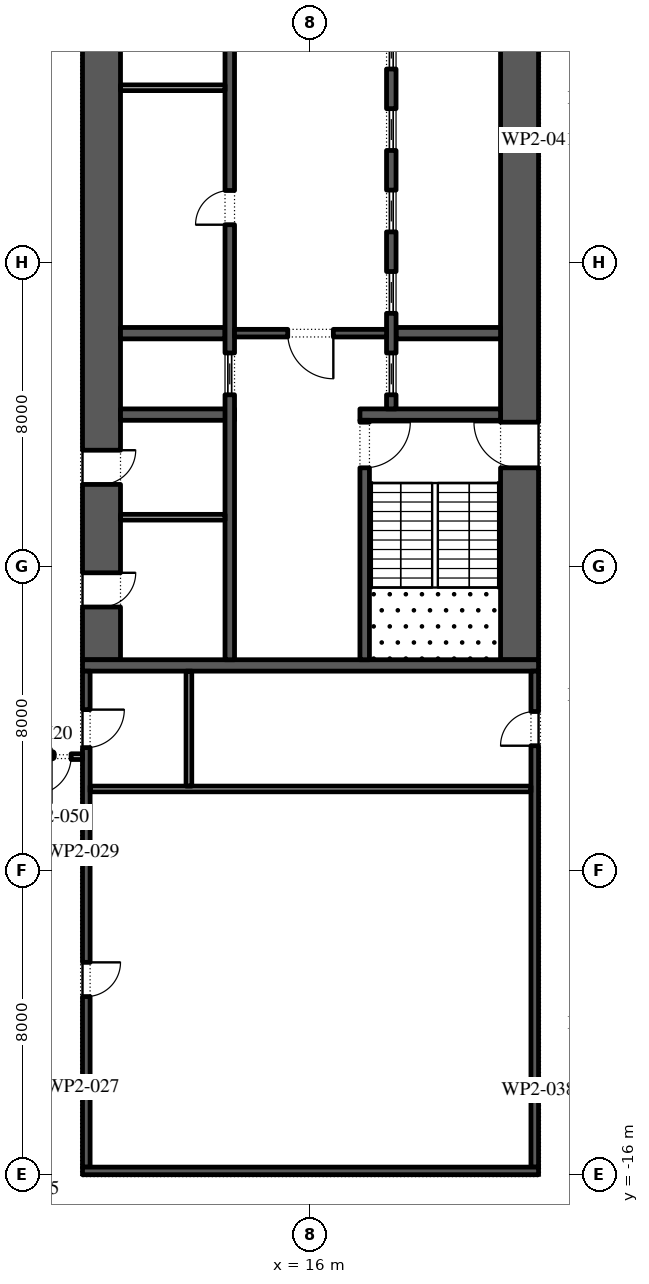
"""IFC4 building model, lengths in metres.
Left out: names, types, materials, properties, quantities, classifications, styles, units other than length and angle.
Written with IfcOpenShell. Run it as: python <this file> out.ifc"""

import sys

from ifc_helpers import new_model, si_unit, direction, frame, frame_2d, origin, place, context, subcontext, project, spatial, rectangle, extrude, element, fill, save


model = new_model("IFC4")
c1 = context("Model", 3, precision=1e-05, world=origin(), true_north=direction((0.0, 1.0)))
c2 = subcontext(c1, "Body", "Model", "MODEL_VIEW")
j1 = project(units=[si_unit("LENGTHUNIT", "METRE"), si_unit("PLANEANGLEUNIT", "RADIAN")], contexts=[c1])
p1 = place(None, origin())
s1 = spatial("IfcSite", under=j1, at=p1, CompositionType="ELEMENT")
p2 = place(p1, origin())
s2 = spatial("IfcBuilding", under=s1, at=p2, CompositionType="ELEMENT")
p3 = place(p2, frame((0.0, 0.0, 39.6)))
s3 = spatial("IfcBuildingStorey", under=s2, at=p3, CompositionType="ELEMENT", Elevation=39.6)
p4 = place(p3, frame((21.5, -2.45, 0.0), z_axis=(0.0, 0.0, 1.0), x_axis=(0.0, 1.0, 0.0)))
e1 = element("IfcWall", 1, at=p4, inside=s3, PredefinedType="SHEAR", context=c2, shape_type="SweptSolid", body=[
    extrude(rectangle(XDim=27.9, YDim=1.0, at=frame_2d((13.95, 0.0))), origin(), (0.0, 0.0, 1.0), 4.0),
])
p5 = place(p4, frame((5.05, 0.0, 0.0)))
e2 = element("IfcOpeningElement", 2, at=p5, cuts=e1, PredefinedType="OPENING", context=c2, shape_type="SweptSolid", body=[
    extrude(rectangle(XDim=1.2, YDim=2.1, at=frame_2d((0.6, 1.05))), frame((0.0, 0.51, 0.0), z_axis=(0.0, -1.0, 0.0), x_axis=(1.0, 0.0, 0.0)), (0.0, 0.0, 1.0), 1.02),
])
p6 = place(p4, frame((21.65, 0.0, 0.0)))
e3 = element("IfcOpeningElement", 3, at=p6, cuts=e1, PredefinedType="OPENING", context=c2, shape_type="SweptSolid", body=[
    extrude(rectangle(XDim=1.2, YDim=2.1, at=frame_2d((0.6, 1.05))), frame((0.0, 0.51, 0.0), z_axis=(0.0, -1.0, 0.0), x_axis=(1.0, 0.0, 0.0)), (0.0, 0.0, 1.0), 1.02),
])
p7 = place(p3, frame((10.5, -2.45, 0.0), z_axis=(0.0, 0.0, 1.0), x_axis=(0.0, 1.0, 0.0)))
e4 = element("IfcWall", 4, at=p7, inside=s3, PredefinedType="SHEAR", context=c2, shape_type="SweptSolid", body=[
    extrude(rectangle(XDim=27.9, YDim=1.0, at=frame_2d((13.95, 0.0))), origin(), (0.0, 0.0, 1.0), 4.0),
])
p8 = place(p7, frame((23.65, 0.0, 0.0)))
e5 = element("IfcOpeningElement", 5, at=p8, cuts=e4, PredefinedType="OPENING", context=c2, shape_type="SweptSolid", body=[
    extrude(rectangle(XDim=2.4, YDim=2.1, at=frame_2d((1.2, 1.05))), frame((0.0, 0.51, 0.0), z_axis=(0.0, -1.0, 0.0), x_axis=(1.0, 0.0, 0.0)), (0.0, 0.0, 1.0), 1.02),
])
p9 = place(p7, frame((1.387, 0.0, 0.0)))
e6 = element("IfcOpeningElement", 6, at=p9, cuts=e4, PredefinedType="OPENING", context=c2, shape_type="SweptSolid", body=[
    extrude(rectangle(XDim=0.9, YDim=2.1, at=frame_2d((0.45, 1.05))), frame((0.0, 0.51, 0.0), z_axis=(0.0, -1.0, 0.0), x_axis=(1.0, 0.0, 0.0)), (0.0, 0.0, 1.0), 1.02),
])
p10 = place(p7, frame((4.613, 0.0, 0.0)))
e7 = element("IfcOpeningElement", 7, at=p10, cuts=e4, PredefinedType="OPENING", context=c2, shape_type="SweptSolid", body=[
    extrude(rectangle(XDim=0.9, YDim=2.1, at=frame_2d((0.45, 1.05))), frame((0.0, 0.51, 0.0), z_axis=(0.0, -1.0, 0.0), x_axis=(1.0, 0.0, 0.0)), (0.0, 0.0, 1.0), 1.02),
])
p11 = place(p3, frame((10.0, -2.6, 0.0), z_axis=(0.0, 0.0, 1.0), x_axis=(1.0, 0.0, 0.0)))
e8 = element("IfcWall", 8, at=p11, inside=s3, PredefinedType="SHEAR", context=c2, shape_type="SweptSolid", body=[
    extrude(rectangle(XDim=12.0, YDim=0.3, at=frame_2d((6.0, 0.0))), origin(), (0.0, 0.0, 1.0), 4.0),
])
p12 = place(p3, frame((17.3, 4.0, 0.0), z_axis=(0.0, 0.0, 1.0), x_axis=(1.0, 0.0, 0.0)))
e9 = element("IfcWall", 9, at=p12, inside=s3, PredefinedType="SHEAR", context=c2, shape_type="SweptSolid", body=[
    extrude(rectangle(XDim=3.7, YDim=0.3, at=frame_2d((1.85, 0.0))), origin(), (0.0, 0.0, 1.0), 4.0),
])
p13 = place(p3, frame((17.425, -2.45, 0.0), z_axis=(0.0, 0.0, 1.0), x_axis=(0.0, 1.0, 0.0)))
e10 = element("IfcWall", 10, at=p13, inside=s3, PredefinedType="SHEAR", context=c2, shape_type="SweptSolid", body=[
    extrude(rectangle(XDim=6.3, YDim=0.25, at=frame_2d((3.15, 0.0))), origin(), (0.0, 0.0, 1.0), 4.0),
])
p14 = place(p13, frame((5.05, 0.0, 0.0)))
e11 = element("IfcOpeningElement", 11, at=p14, cuts=e10, PredefinedType="OPENING", context=c2, shape_type="SweptSolid", body=[
    extrude(rectangle(XDim=1.2, YDim=2.1, at=frame_2d((0.6, 1.05))), frame((0.0, 0.135, 0.0), z_axis=(0.0, -1.0, 0.0), x_axis=(1.0, 0.0, 0.0)), (0.0, 0.0, 1.0), 0.27),
])
p15 = place(p3, frame((18.25, 6.143, 0.0), z_axis=(0.0, 0.0, 1.0), x_axis=(1.0, 0.0, 0.0)))
e12 = element("IfcWall", 12, at=p15, inside=s3, PredefinedType="SHEAR", context=c2, shape_type="SweptSolid", body=[
    extrude(rectangle(XDim=2.75, YDim=0.3, at=frame_2d((1.375, 0.0))), origin(), (0.0, 0.0, 1.0), 4.0),
])
p16 = place(p3, frame((18.125, 4.15, 0.0), z_axis=(0.0, 0.0, 1.0), x_axis=(0.0, 1.0, 0.0)))
e13 = element("IfcWall", 13, at=p16, inside=s3, PredefinedType="SHEAR", context=c2, shape_type="SweptSolid", body=[
    extrude(rectangle(XDim=14.7, YDim=0.25, at=frame_2d((7.35, 0.0))), origin(), (0.0, 0.0, 1.0), 4.0),
])
p17 = place(p16, frame((0.371, 0.0, 0.0)))
e14 = element("IfcOpeningElement", 14, at=p17, cuts=e13, PredefinedType="OPENING", context=c2, shape_type="SweptSolid", body=[
    extrude(rectangle(XDim=1.1, YDim=2.1, at=frame_2d((0.55, 1.05))), frame((0.0, 0.135, 0.0), z_axis=(0.0, -1.0, 0.0), x_axis=(1.0, 0.0, 0.0)), (0.0, 0.0, 1.0), 0.27),
])
p18 = place(p16, frame((2.514, 0.0, 0.0)))
e15 = element("IfcOpeningElement", 15, at=p18, cuts=e13, PredefinedType="OPENING", context=c2, shape_type="SweptSolid", body=[
    extrude(rectangle(XDim=1.1, YDim=2.1, at=frame_2d((0.55, 1.05))), frame((0.0, 0.135, 0.0), z_axis=(0.0, -1.0, 0.0), x_axis=(1.0, 0.0, 0.0)), (0.0, 0.0, 1.0), 0.27),
])
p19 = place(p16, frame((4.657, 0.0, 0.0)))
e16 = element("IfcOpeningElement", 16, at=p19, cuts=e13, PredefinedType="OPENING", context=c2, shape_type="SweptSolid", body=[
    extrude(rectangle(XDim=1.1, YDim=2.1, at=frame_2d((0.55, 1.05))), frame((0.0, 0.135, 0.0), z_axis=(0.0, -1.0, 0.0), x_axis=(1.0, 0.0, 0.0)), (0.0, 0.0, 1.0), 0.27),
])
p20 = place(p16, frame((6.8, 0.0, 0.0)))
e17 = element("IfcOpeningElement", 17, at=p20, cuts=e13, PredefinedType="OPENING", context=c2, shape_type="SweptSolid", body=[
    extrude(rectangle(XDim=1.1, YDim=2.1, at=frame_2d((0.55, 1.05))), frame((0.0, 0.135, 0.0), z_axis=(0.0, -1.0, 0.0), x_axis=(1.0, 0.0, 0.0)), (0.0, 0.0, 1.0), 0.27),
])
p21 = place(p16, frame((8.943, 0.0, 0.0)))
e18 = element("IfcOpeningElement", 18, at=p21, cuts=e13, PredefinedType="OPENING", context=c2, shape_type="SweptSolid", body=[
    extrude(rectangle(XDim=1.1, YDim=2.1, at=frame_2d((0.55, 1.05))), frame((0.0, 0.135, 0.0), z_axis=(0.0, -1.0, 0.0), x_axis=(1.0, 0.0, 0.0)), (0.0, 0.0, 1.0), 0.27),
])
p22 = place(p16, frame((11.086, 0.0, 0.0)))
e19 = element("IfcOpeningElement", 19, at=p22, cuts=e13, PredefinedType="OPENING", context=c2, shape_type="SweptSolid", body=[
    extrude(rectangle(XDim=1.1, YDim=2.1, at=frame_2d((0.55, 1.05))), frame((0.0, 0.135, 0.0), z_axis=(0.0, -1.0, 0.0), x_axis=(1.0, 0.0, 0.0)), (0.0, 0.0, 1.0), 0.27),
])
p23 = place(p16, frame((13.229, 0.0, 0.0)))
e20 = element("IfcOpeningElement", 20, at=p23, cuts=e13, PredefinedType="OPENING", context=c2, shape_type="SweptSolid", body=[
    extrude(rectangle(XDim=1.1, YDim=2.1, at=frame_2d((0.55, 1.05))), frame((0.0, 0.135, 0.0), z_axis=(0.0, -1.0, 0.0), x_axis=(1.0, 0.0, 0.0)), (0.0, 0.0, 1.0), 0.27),
])
p24 = place(p3, frame((11.0, 4.0, 0.0), z_axis=(0.0, 0.0, 1.0), x_axis=(1.0, 0.0, 0.0)))
e21 = element("IfcWall", 21, at=p24, inside=s3, PredefinedType="SHEAR", context=c2, shape_type="SweptSolid", body=[
    extrude(rectangle(XDim=3.0, YDim=0.3, at=frame_2d((1.5, 0.0))), origin(), (0.0, 0.0, 1.0), 4.0),
])
p25 = place(p3, frame((11.0, 6.143, 0.0), z_axis=(0.0, 0.0, 1.0), x_axis=(1.0, 0.0, 0.0)))
e22 = element("IfcWall", 22, at=p25, inside=s3, PredefinedType="SHEAR", context=c2, shape_type="SweptSolid", body=[
    extrude(rectangle(XDim=2.75, YDim=0.3, at=frame_2d((1.375, 0.0))), origin(), (0.0, 0.0, 1.0), 4.0),
])
p26 = place(p3, frame((13.875, -2.45, 0.0), z_axis=(0.0, 0.0, 1.0), x_axis=(0.0, 1.0, 0.0)))
e23 = element("IfcWall", 23, at=p26, inside=s3, PredefinedType="SHEAR", context=c2, shape_type="SweptSolid", body=[
    extrude(rectangle(XDim=21.3, YDim=0.25, at=frame_2d((10.65, 0.0))), origin(), (0.0, 0.0, 1.0), 4.0),
])
p27 = place(p26, frame((11.446, 0.0, 0.0)))
e24 = element("IfcOpeningElement", 24, at=p27, cuts=e23, PredefinedType="OPENING", context=c2, shape_type="SweptSolid", body=[
    extrude(rectangle(XDim=0.9, YDim=2.1, at=frame_2d((0.45, 1.05))), frame((0.0, 0.135, 0.0), z_axis=(0.0, -1.0, 0.0), x_axis=(1.0, 0.0, 0.0)), (0.0, 0.0, 1.0), 0.27),
])
p28 = place(p26, frame((17.725, 0.0, 0.0)))
e25 = element("IfcOpeningElement", 25, at=p28, cuts=e23, PredefinedType="OPENING", context=c2, shape_type="SweptSolid", body=[
    extrude(rectangle(XDim=0.9, YDim=2.1, at=frame_2d((0.45, 1.05))), frame((0.0, 0.135, 0.0), z_axis=(0.0, -1.0, 0.0), x_axis=(1.0, 0.0, 0.0)), (0.0, 0.0, 1.0), 0.27),
])
p29 = place(p26, frame((6.971, 0.0, 0.0)))
e26 = element("IfcOpeningElement", 26, at=p29, cuts=e23, PredefinedType="OPENING", context=c2, shape_type="SweptSolid", body=[
    extrude(rectangle(XDim=1.1, YDim=2.1, at=frame_2d((0.55, 1.05))), frame((0.0, 0.135, 0.0), z_axis=(0.0, -1.0, 0.0), x_axis=(1.0, 0.0, 0.0)), (0.0, 0.0, 1.0), 0.27),
])
p30 = place(p3, frame((11.0, 12.6, 0.0), z_axis=(0.0, 0.0, 1.0), x_axis=(1.0, 0.0, 0.0)))
e27 = element("IfcWall", 27, at=p30, inside=s3, PredefinedType="PARTITIONING", context=c2, shape_type="SweptSolid", body=[
    extrude(rectangle(XDim=2.75, YDim=0.15, at=frame_2d((1.375, 0.0))), origin(), (0.0, 0.0, 1.0), 4.0),
])
p31 = place(p3, frame((14.0, 6.143, 0.0), z_axis=(0.0, 0.0, 1.0), x_axis=(1.0, 0.0, 0.0)))
e28 = element("IfcWall", 28, at=p31, inside=s3, PredefinedType="SHEAR", context=c2, shape_type="SweptSolid", body=[
    extrude(rectangle(XDim=4.0, YDim=0.2, at=frame_2d((2.0, 0.0))), origin(), (0.0, 0.0, 1.0), 4.0),
])
p32 = place(p31, frame((1.4, 0.0, 0.0)))
e29 = element("IfcOpeningElement", 29, at=p32, cuts=e28, PredefinedType="OPENING", context=c2, shape_type="SweptSolid", body=[
    extrude(rectangle(XDim=1.2, YDim=2.1, at=frame_2d((0.6, 1.05))), frame((0.0, 0.11, 0.0), z_axis=(0.0, -1.0, 0.0), x_axis=(1.0, 0.0, 0.0)), (0.0, 0.0, 1.0), 0.22),
])
p33 = place(p3, frame((11.0, 1.3, 0.0), z_axis=(0.0, 0.0, 1.0), x_axis=(1.0, 0.0, 0.0)))
e30 = element("IfcWall", 30, at=p33, inside=s3, PredefinedType="PARTITIONING", context=c2, shape_type="SweptSolid", body=[
    extrude(rectangle(XDim=2.75, YDim=0.15, at=frame_2d((1.375, 0.0))), origin(), (0.0, 0.0, 1.0), 4.0),
])
p34 = place(p3, frame((21.9, -15.8, 0.0), z_axis=(0.0, 0.0, 1.0), x_axis=(0.0, 1.0, 0.0)))
e31 = element("IfcWall", 31, at=p34, inside=s3, PredefinedType="SHEAR", context=c2, shape_type="SweptSolid", body=[
    extrude(rectangle(XDim=13.05, YDim=0.2, at=frame_2d((6.525, 0.0))), origin(), (0.0, 0.0, 1.0), 4.0),
])
p35 = place(p34, frame((11.087, 0.0, 0.0)))
e32 = element("IfcOpeningElement", 32, at=p35, cuts=e31, PredefinedType="OPENING", context=c2, shape_type="SweptSolid", body=[
    extrude(rectangle(XDim=0.9, YDim=2.1, at=frame_2d((0.45, 1.05))), frame((0.0, 0.11, 0.0), z_axis=(0.0, -1.0, 0.0), x_axis=(1.0, 0.0, 0.0)), (0.0, 0.0, 1.0), 0.22),
])
p36 = place(p3, frame((10.1, -15.8, 0.0), z_axis=(0.0, 0.0, 1.0), x_axis=(0.0, 1.0, 0.0)))
e33 = element("IfcWall", 33, at=p36, inside=s3, PredefinedType="SHEAR", context=c2, shape_type="SweptSolid", body=[
    extrude(rectangle(XDim=13.05, YDim=0.2, at=frame_2d((6.525, 0.0))), origin(), (0.0, 0.0, 1.0), 4.0),
])
p37 = place(p36, frame((4.488, 0.0, 0.0)))
e34 = element("IfcOpeningElement", 34, at=p37, cuts=e33, PredefinedType="OPENING", context=c2, shape_type="SweptSolid", body=[
    extrude(rectangle(XDim=0.9, YDim=2.1, at=frame_2d((0.45, 1.05))), frame((0.0, 0.11, 0.0), z_axis=(0.0, -1.0, 0.0), x_axis=(1.0, 0.0, 0.0)), (0.0, 0.0, 1.0), 0.22),
])
p38 = place(p36, frame((11.038, 0.0, 0.0)))
e35 = element("IfcOpeningElement", 35, at=p38, cuts=e33, PredefinedType="OPENING", context=c2, shape_type="SweptSolid", body=[
    extrude(rectangle(XDim=1.0, YDim=2.1, at=frame_2d((0.5, 1.05))), frame((0.0, 0.11, 0.0), z_axis=(0.0, -1.0, 0.0), x_axis=(1.0, 0.0, 0.0)), (0.0, 0.0, 1.0), 0.22),
])
p39 = place(p3, frame((10.0, -15.9, 0.0), z_axis=(0.0, 0.0, 1.0), x_axis=(1.0, 0.0, 0.0)))
e36 = element("IfcWall", 36, at=p39, inside=s3, PredefinedType="SHEAR", context=c2, shape_type="SweptSolid", body=[
    extrude(rectangle(XDim=12.0, YDim=0.2, at=frame_2d((6.0, 0.0))), origin(), (0.0, 0.0, 1.0), 4.0),
])
p40 = place(p3, frame((10.2, -5.85, 0.0), z_axis=(0.0, 0.0, 1.0), x_axis=(1.0, 0.0, 0.0)))
e37 = element("IfcWall", 37, at=p40, inside=s3, PredefinedType="PARTITIONING", context=c2, shape_type="SweptSolid", body=[
    extrude(rectangle(XDim=11.6, YDim=0.15, at=frame_2d((5.8, 0.0))), origin(), (0.0, 0.0, 1.0), 4.0),
])
p41 = place(p3, frame((12.8, -5.775, 0.0), z_axis=(0.0, 0.0, 1.0), x_axis=(0.0, 1.0, 0.0)))
e38 = element("IfcWall", 38, at=p41, inside=s3, PredefinedType="PARTITIONING", context=c2, shape_type="SweptSolid", body=[
    extrude(rectangle(XDim=3.025, YDim=0.15, at=frame_2d((1.512, 0.0))), origin(), (0.0, 0.0, 1.0), 4.0),
])
p42 = place(p3, frame((10.0, -5.0, 0.0), z_axis=(0.0, 0.0, 1.0), x_axis=(-1.0, 0.0, 0.0)))
e39 = element("IfcWall", 39, at=p42, inside=s3, PredefinedType="PARTITIONING", context=c2, shape_type="SweptSolid", body=[
    extrude(rectangle(XDim=1.6, YDim=0.15, at=frame_2d((0.8, 0.0))), origin(), (0.0, 0.0, 1.0), 4.0),
])
p43 = place(p42, frame((0.3, 0.0, 0.0)))
e40 = element("IfcOpeningElement", 40, at=p43, cuts=e39, PredefinedType="OPENING", context=c2, shape_type="SweptSolid", body=[
    extrude(rectangle(XDim=1.0, YDim=2.1, at=frame_2d((0.5, 1.05))), frame((0.0, 0.085, 0.0), z_axis=(0.0, -1.0, 0.0), x_axis=(1.0, 0.0, 0.0)), (0.0, 0.0, 1.0), 0.17),
])
p44 = place(p17, origin())
e41 = element("IfcDoor", 41, at=p44, inside=s3, OperationType="SLIDING_TO_LEFT", PredefinedType="DOOR", context=c2, shape_type="SweptSolid", body=[
    extrude(rectangle(XDim=1.1, YDim=2.1, at=frame_2d((0.55, 1.05))), frame((0.0, 0.025, 0.0), z_axis=(0.0, -1.0, 0.0), x_axis=(1.0, 0.0, 0.0)), (0.0, 0.0, 1.0), 0.05),
])
fill(e14, e41)
p45 = place(p18, origin())
e42 = element("IfcDoor", 42, at=p45, inside=s3, OperationType="SLIDING_TO_LEFT", PredefinedType="DOOR", context=c2, shape_type="SweptSolid", body=[
    extrude(rectangle(XDim=1.1, YDim=2.1, at=frame_2d((0.55, 1.05))), frame((0.0, 0.025, 0.0), z_axis=(0.0, -1.0, 0.0), x_axis=(1.0, 0.0, 0.0)), (0.0, 0.0, 1.0), 0.05),
])
fill(e15, e42)
p46 = place(p19, origin())
e43 = element("IfcDoor", 43, at=p46, inside=s3, OperationType="SLIDING_TO_LEFT", PredefinedType="DOOR", context=c2, shape_type="SweptSolid", body=[
    extrude(rectangle(XDim=1.1, YDim=2.1, at=frame_2d((0.55, 1.05))), frame((0.0, 0.025, 0.0), z_axis=(0.0, -1.0, 0.0), x_axis=(1.0, 0.0, 0.0)), (0.0, 0.0, 1.0), 0.05),
])
fill(e16, e43)
p47 = place(p20, origin())
e44 = element("IfcDoor", 44, at=p47, inside=s3, OperationType="SLIDING_TO_LEFT", PredefinedType="DOOR", context=c2, shape_type="SweptSolid", body=[
    extrude(rectangle(XDim=1.1, YDim=2.1, at=frame_2d((0.55, 1.05))), frame((0.0, 0.025, 0.0), z_axis=(0.0, -1.0, 0.0), x_axis=(1.0, 0.0, 0.0)), (0.0, 0.0, 1.0), 0.05),
])
fill(e17, e44)
p48 = place(p21, origin())
e45 = element("IfcDoor", 45, at=p48, inside=s3, OperationType="SLIDING_TO_LEFT", PredefinedType="DOOR", context=c2, shape_type="SweptSolid", body=[
    extrude(rectangle(XDim=1.1, YDim=2.1, at=frame_2d((0.55, 1.05))), frame((0.0, 0.025, 0.0), z_axis=(0.0, -1.0, 0.0), x_axis=(1.0, 0.0, 0.0)), (0.0, 0.0, 1.0), 0.05),
])
fill(e18, e45)
p49 = place(p27, origin())
e46 = element("IfcDoor", 46, at=p49, inside=s3, OperationType="SINGLE_SWING_RIGHT", PredefinedType="DOOR", context=c2, shape_type="SweptSolid", body=[
    extrude(rectangle(XDim=0.9, YDim=2.1, at=frame_2d((0.45, 1.05))), frame((0.0, 0.125, 0.0), z_axis=(0.0, -1.0, 0.0), x_axis=(1.0, 0.0, 0.0)), (0.0, 0.0, 1.0), 0.05),
])
fill(e24, e46)
p50 = place(p29, origin())
e47 = element("IfcDoor", 47, at=p50, inside=s3, OperationType="SLIDING_TO_LEFT", PredefinedType="DOOR", context=c2, shape_type="SweptSolid", body=[
    extrude(rectangle(XDim=1.1, YDim=2.1, at=frame_2d((0.55, 1.05))), frame((0.0, 0.025, 0.0), z_axis=(0.0, -1.0, 0.0), x_axis=(1.0, 0.0, 0.0)), (0.0, 0.0, 1.0), 0.05),
])
fill(e26, e47)
p51 = place(p32, frame((1.2, 0.0, 0.0), z_axis=(0.0, 0.0, 1.0), x_axis=(-1.0, 0.0, 0.0)))
e48 = element("IfcDoor", 48, at=p51, inside=s3, OperationType="SINGLE_SWING_RIGHT", PredefinedType="DOOR", context=c2, shape_type="SweptSolid", body=[
    extrude(rectangle(XDim=1.2, YDim=2.1, at=frame_2d((0.6, 1.05))), frame((0.0, 0.025, 0.0), z_axis=(0.0, -1.0, 0.0), x_axis=(1.0, 0.0, 0.0)), (0.0, 0.0, 1.0), 0.05),
])
fill(e29, e48)
p52 = place(p14, frame((1.2, 0.0, 0.0), z_axis=(0.0, 0.0, 1.0), x_axis=(-1.0, 0.0, 0.0)))
e49 = element("IfcDoor", 49, at=p52, inside=s3, OperationType="SINGLE_SWING_RIGHT", PredefinedType="DOOR", context=c2, shape_type="SweptSolid", body=[
    extrude(rectangle(XDim=1.2, YDim=2.1, at=frame_2d((0.6, 1.05))), frame((0.0, 0.025, 0.0), z_axis=(0.0, -1.0, 0.0), x_axis=(1.0, 0.0, 0.0)), (0.0, 0.0, 1.0), 0.05),
])
fill(e11, e49)
p53 = place(p5, origin())
e50 = element("IfcDoor", 50, at=p53, inside=s3, OperationType="SINGLE_SWING_LEFT", PredefinedType="DOOR", context=c2, shape_type="SweptSolid", body=[
    extrude(rectangle(XDim=1.2, YDim=2.1, at=frame_2d((0.6, 1.05))), frame((0.0, 0.025, 0.0), z_axis=(0.0, -1.0, 0.0), x_axis=(1.0, 0.0, 0.0)), (0.0, 0.0, 1.0), 0.05),
])
fill(e2, e50)
p54 = place(p9, frame((0.9, -0.95, 0.0), z_axis=(0.0, 0.0, 1.0), x_axis=(-1.0, 0.0, 0.0)))
e51 = element("IfcDoor", 51, at=p54, inside=s3, OperationType="SINGLE_SWING_RIGHT", PredefinedType="DOOR", context=c2, shape_type="SweptSolid", body=[
    extrude(rectangle(XDim=0.9, YDim=2.1, at=frame_2d((0.45, 1.05))), frame((0.0, -0.45, 0.0), z_axis=(0.0, -1.0, 0.0), x_axis=(1.0, 0.0, 0.0)), (0.0, 0.0, 1.0), 0.05),
])
fill(e6, e51)
p55 = place(p10, frame((0.9, -0.95, 0.0), z_axis=(0.0, 0.0, 1.0), x_axis=(-1.0, 0.0, 0.0)))
e52 = element("IfcDoor", 52, at=p55, inside=s3, OperationType="SINGLE_SWING_RIGHT", PredefinedType="DOOR", context=c2, shape_type="SweptSolid", body=[
    extrude(rectangle(XDim=0.9, YDim=2.1, at=frame_2d((0.45, 1.05))), frame((0.0, -0.45, 0.0), z_axis=(0.0, -1.0, 0.0), x_axis=(1.0, 0.0, 0.0)), (0.0, 0.0, 1.0), 0.05),
])
fill(e7, e52)
p56 = place(p37, frame((0.9, -0.15, 0.0), z_axis=(0.0, 0.0, 1.0), x_axis=(-1.0, 0.0, 0.0)))
e53 = element("IfcDoor", 53, at=p56, inside=s3, OperationType="SINGLE_SWING_RIGHT", PredefinedType="DOOR", context=c2, shape_type="SweptSolid", body=[
    extrude(rectangle(XDim=0.9, YDim=2.1, at=frame_2d((0.45, 1.05))), frame((0.0, -0.05, 0.0), z_axis=(0.0, -1.0, 0.0), x_axis=(1.0, 0.0, 0.0)), (0.0, 0.0, 1.0), 0.05),
])
fill(e34, e53)
p57 = place(p38, frame((1.0, -0.15, 0.0), z_axis=(0.0, 0.0, 1.0), x_axis=(-1.0, 0.0, 0.0)))
e54 = element("IfcDoor", 54, at=p57, inside=s3, OperationType="SINGLE_SWING_RIGHT", PredefinedType="DOOR", context=c2, shape_type="SweptSolid", body=[
    extrude(rectangle(XDim=1.0, YDim=2.1, at=frame_2d((0.5, 1.05))), frame((0.0, -0.05, 0.0), z_axis=(0.0, -1.0, 0.0), x_axis=(1.0, 0.0, 0.0)), (0.0, 0.0, 1.0), 0.05),
])
fill(e35, e54)
p58 = place(p35, origin())
e55 = element("IfcDoor", 55, at=p58, inside=s3, OperationType="SINGLE_SWING_RIGHT", PredefinedType="DOOR", context=c2, shape_type="SweptSolid", body=[
    extrude(rectangle(XDim=0.9, YDim=2.1, at=frame_2d((0.45, 1.05))), frame((0.0, 0.1, 0.0), z_axis=(0.0, -1.0, 0.0), x_axis=(1.0, 0.0, 0.0)), (0.0, 0.0, 1.0), 0.05),
])
fill(e32, e55)
p59 = place(p43, origin())
e56 = element("IfcDoor", 56, at=p59, inside=s3, OperationType="SINGLE_SWING_LEFT", PredefinedType="DOOR", context=c2, shape_type="SweptSolid", body=[
    extrude(rectangle(XDim=1.0, YDim=2.1, at=frame_2d((0.5, 1.05))), frame((0.0, 0.025, 0.0), z_axis=(0.0, -1.0, 0.0), x_axis=(1.0, 0.0, 0.0)), (0.0, 0.0, 1.0), 0.05),
])
fill(e40, e56)
save(model, sys.argv[1])
